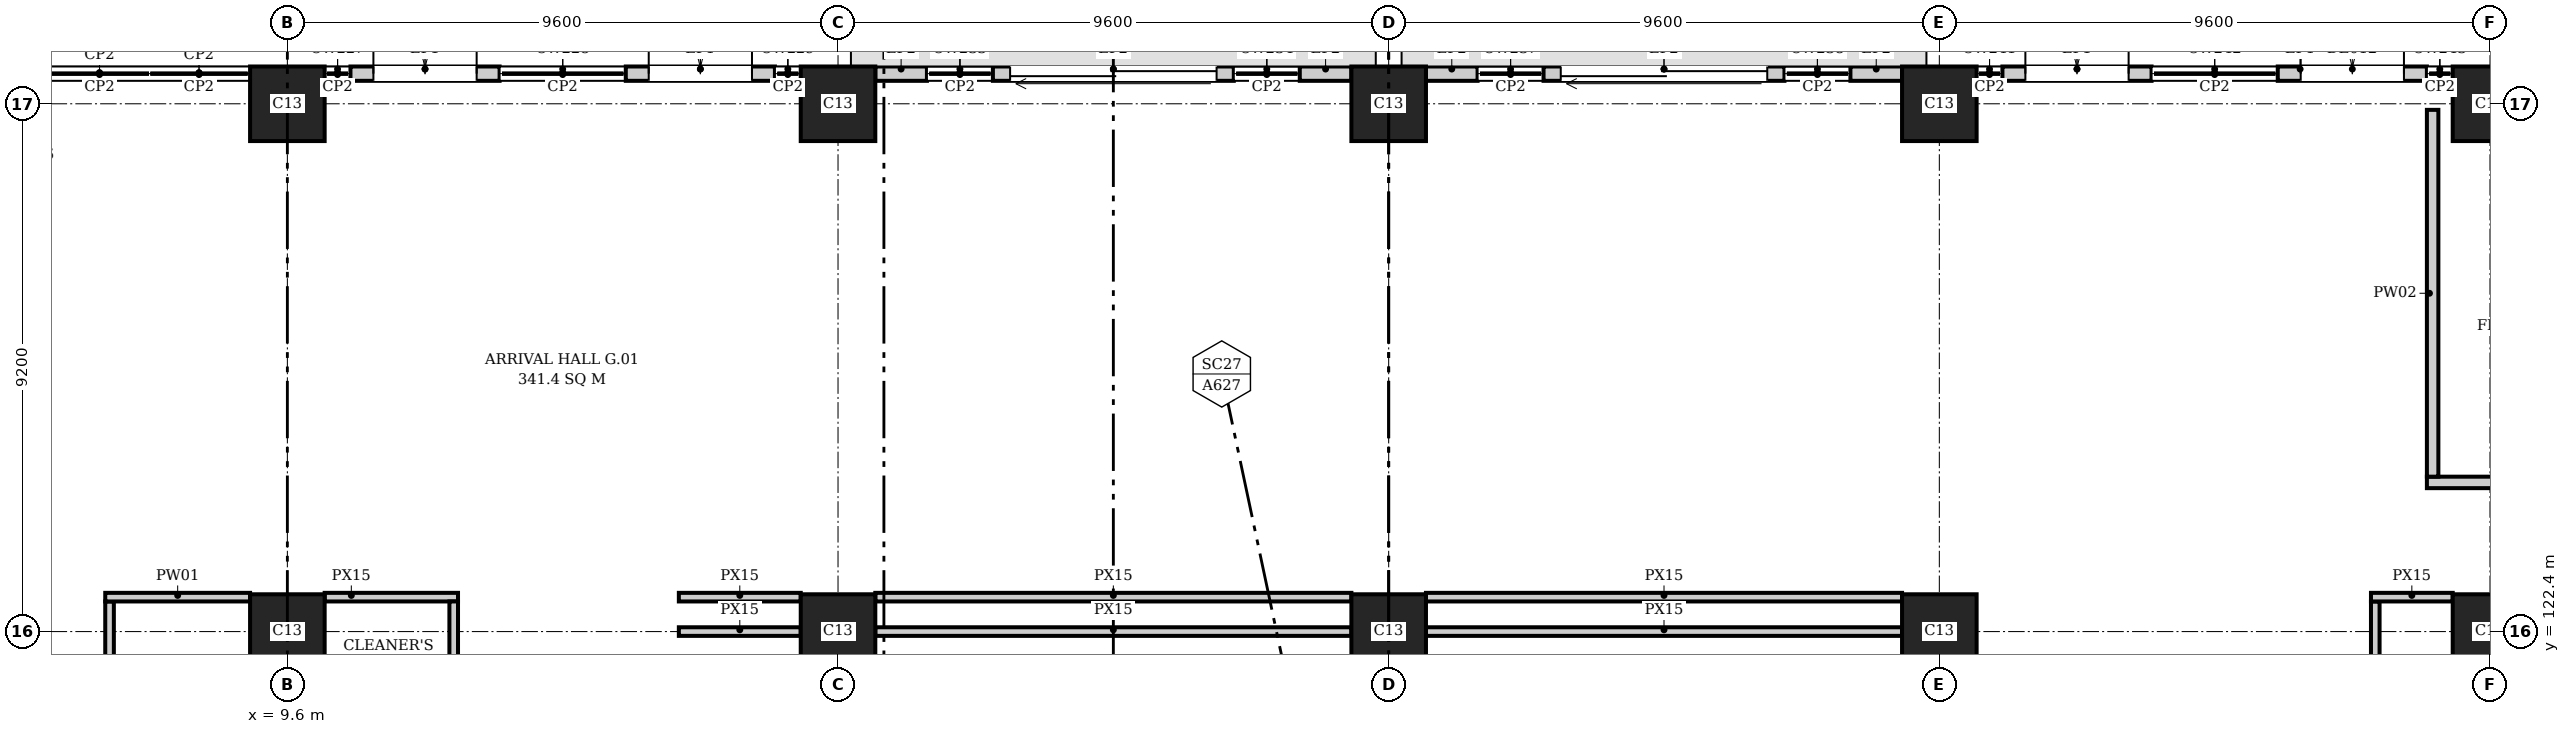
"""IFC4 building model, lengths in metres.
Left out: names, types, materials, properties, quantities, classifications, styles, units other than length and angle.
Written with IfcOpenShell. Run it as: python <this file> out.ifc"""

import sys

from ifc_helpers import new_model, si_unit, direction, frame, frame_2d, origin, origin_2d, place, context, subcontext, project, spatial, rectangle, extrude, element, fill, save


model = new_model("IFC4")
c1 = context("Model", 3, precision=1e-05, world=origin(), true_north=direction((0.0, 1.0)))
c2 = subcontext(c1, "Body", "Model", "MODEL_VIEW")
j1 = project(units=[si_unit("LENGTHUNIT", "METRE"), si_unit("PLANEANGLEUNIT", "RADIAN")], contexts=[c1])
p1 = place(None, origin())
s1 = spatial("IfcSite", under=j1, at=p1, CompositionType="ELEMENT")
p2 = place(p1, origin())
s2 = spatial("IfcBuilding", under=s1, at=p2, CompositionType="ELEMENT")
p3 = place(p2, origin())
s3 = spatial("IfcBuildingStorey", under=s2, at=p3, CompositionType="ELEMENT", Elevation=0.0)
for number, where, z_axis, x_axis in (
    (1, (9.6, 122.4, 0.0), (0.0, 0.0, 1.0), (1.0, 0.0, 0.0)),
    (2, (19.2, 122.4, 0.0), (0.0, 0.0, 1.0), (1.0, 0.0, 0.0)),
    (3, (28.8, 122.4, 0.0), (0.0, 0.0, 1.0), (1.0, 0.0, 0.0)),
    (4, (38.4, 122.4, 0.0), (0.0, 0.0, 1.0), (1.0, 0.0, 0.0)),
    (5, (48.0, 122.4, 0.0), (0.0, 0.0, 1.0), (1.0, 0.0, 0.0)),
    (6, (9.6, 131.6, 0.0), (0.0, 0.0, 1.0), (1.0, 0.0, 0.0)),
    (7, (19.2, 131.6, 0.0), (0.0, 0.0, 1.0), (1.0, 0.0, 0.0)),
    (8, (28.8, 131.6, 0.0), (0.0, 0.0, 1.0), (1.0, 0.0, 0.0)),
    (9, (38.4, 131.6, 0.0), (0.0, 0.0, 1.0), (1.0, 0.0, 0.0)),
    (10, (48.0, 131.6, 0.0), (0.0, 0.0, 1.0), (1.0, 0.0, 0.0)),
):
    element("IfcColumn", number, at=place(p3, frame(where, z_axis=z_axis, x_axis=x_axis)), inside=s3, PredefinedType="COLUMN", context=c2, shape_type="SweptSolid", body=[
        extrude(rectangle(XDim=1.3, YDim=1.3, at=origin_2d()), origin(), (0.0, 0.0, 1.0), 6.5),
    ])
p4 = place(p3, frame((13.3, 132.125, 0.0), z_axis=(0.0, 0.0, 1.0), x_axis=(-1.0, 0.0, 0.0)))
e11 = element("IfcWall", 11, at=p4, inside=s3, PredefinedType="ELEMENTEDWALL", context=c2, shape_type="SweptSolid", body=[
    extrude(rectangle(XDim=2.6, YDim=0.25, at=frame_2d((1.3, 0.0))), origin(), (0.0, 0.0, 1.0), 5.75),
])
p5 = place(p4, frame((0.4, 0.0, 0.0)))
e12 = element("IfcOpeningElement", 12, at=p5, cuts=e11, PredefinedType="OPENING", context=c2, shape_type="SweptSolid", body=[
    extrude(rectangle(XDim=1.8, YDim=2.4, at=frame_2d((0.9, 1.2))), frame((0.0, 0.135, 0.0), z_axis=(0.0, -1.0, 0.0), x_axis=(1.0, 0.0, 0.0)), (0.0, 0.0, 1.0), 0.27),
])
p6 = place(p3, frame((18.1, 132.125, 0.0), z_axis=(0.0, 0.0, 1.0), x_axis=(-1.0, 0.0, 0.0)))
e13 = element("IfcWall", 13, at=p6, inside=s3, PredefinedType="ELEMENTEDWALL", context=c2, shape_type="SweptSolid", body=[
    extrude(rectangle(XDim=2.6, YDim=0.25, at=frame_2d((1.3, 0.0))), origin(), (0.0, 0.0, 1.0), 5.75),
])
p7 = place(p6, frame((0.4, 0.0, 0.0)))
e14 = element("IfcOpeningElement", 14, at=p7, cuts=e13, PredefinedType="OPENING", context=c2, shape_type="SweptSolid", body=[
    extrude(rectangle(XDim=1.8, YDim=2.4, at=frame_2d((0.9, 1.2))), frame((0.0, 0.135, 0.0), z_axis=(0.0, -1.0, 0.0), x_axis=(1.0, 0.0, 0.0)), (0.0, 0.0, 1.0), 0.27),
])
p8 = place(p3, frame((20.75, 132.125, 0.0), z_axis=(0.0, 0.0, 1.0), x_axis=(-1.0, 0.0, 0.0)))
e15 = element("IfcWall", 15, at=p8, inside=s3, PredefinedType="ELEMENTEDWALL", context=c2, shape_type="SweptSolid", body=[
    extrude(rectangle(XDim=0.9, YDim=0.25, at=frame_2d((0.45, 0.0))), origin(), (0.0, 0.0, 1.0), 5.75),
])
p9 = place(p3, frame((26.1, 132.125, 0.0), z_axis=(0.0, 0.0, 1.0), x_axis=(-1.0, 0.0, 0.0)))
e16 = element("IfcWall", 16, at=p9, inside=s3, PredefinedType="ELEMENTEDWALL", context=c2, shape_type="SweptSolid", body=[
    extrude(rectangle(XDim=4.2, YDim=0.25, at=frame_2d((2.1, 0.0))), origin(), (0.0, 0.0, 1.0), 5.75),
])
p10 = place(p9, frame((0.3, 0.0, 0.0)))
e17 = element("IfcOpeningElement", 17, at=p10, cuts=e16, PredefinedType="OPENING", context=c2, shape_type="SweptSolid", body=[
    extrude(rectangle(XDim=3.6, YDim=4.5, at=frame_2d((1.8, 2.25))), frame((0.0, 0.135, 0.0), z_axis=(0.0, -1.0, 0.0), x_axis=(1.0, 0.0, 0.0)), (0.0, 0.0, 1.0), 0.27),
])
p11 = place(p3, frame((28.15, 132.125, 0.0), z_axis=(0.0, 0.0, 1.0), x_axis=(-1.0, 0.0, 0.0)))
e18 = element("IfcWall", 18, at=p11, inside=s3, PredefinedType="ELEMENTEDWALL", context=c2, shape_type="SweptSolid", body=[
    extrude(rectangle(XDim=0.9, YDim=0.25, at=frame_2d((0.45, 0.0))), origin(), (0.0, 0.0, 1.0), 5.75),
])
p12 = place(p3, frame((30.35, 132.125, 0.0), z_axis=(0.0, 0.0, 1.0), x_axis=(-1.0, 0.0, 0.0)))
e19 = element("IfcWall", 19, at=p12, inside=s3, PredefinedType="ELEMENTEDWALL", context=c2, shape_type="SweptSolid", body=[
    extrude(rectangle(XDim=0.9, YDim=0.25, at=frame_2d((0.45, 0.0))), origin(), (0.0, 0.0, 1.0), 5.75),
])
p13 = place(p3, frame((35.7, 132.125, 0.0), z_axis=(0.0, 0.0, 1.0), x_axis=(-1.0, 0.0, 0.0)))
e20 = element("IfcWall", 20, at=p13, inside=s3, PredefinedType="ELEMENTEDWALL", context=c2, shape_type="SweptSolid", body=[
    extrude(rectangle(XDim=4.2, YDim=0.25, at=frame_2d((2.1, 0.0))), origin(), (0.0, 0.0, 1.0), 5.75),
])
p14 = place(p13, frame((0.3, 0.0, 0.0)))
e21 = element("IfcOpeningElement", 21, at=p14, cuts=e20, PredefinedType="OPENING", context=c2, shape_type="SweptSolid", body=[
    extrude(rectangle(XDim=3.6, YDim=4.5, at=frame_2d((1.8, 2.25))), frame((0.0, 0.135, 0.0), z_axis=(0.0, -1.0, 0.0), x_axis=(1.0, 0.0, 0.0)), (0.0, 0.0, 1.0), 0.27),
])
p15 = place(p3, frame((37.75, 132.125, 0.0), z_axis=(0.0, 0.0, 1.0), x_axis=(-1.0, 0.0, 0.0)))
e22 = element("IfcWall", 22, at=p15, inside=s3, PredefinedType="ELEMENTEDWALL", context=c2, shape_type="SweptSolid", body=[
    extrude(rectangle(XDim=0.9, YDim=0.25, at=frame_2d((0.45, 0.0))), origin(), (0.0, 0.0, 1.0), 5.75),
])
p16 = place(p3, frame((42.1, 132.125, 0.0), z_axis=(0.0, 0.0, 1.0), x_axis=(-1.0, 0.0, 0.0)))
e23 = element("IfcWall", 23, at=p16, inside=s3, PredefinedType="ELEMENTEDWALL", context=c2, shape_type="SweptSolid", body=[
    extrude(rectangle(XDim=2.6, YDim=0.25, at=frame_2d((1.3, 0.0))), origin(), (0.0, 0.0, 1.0), 5.75),
])
p17 = place(p16, frame((0.4, 0.0, 0.0)))
e24 = element("IfcOpeningElement", 24, at=p17, cuts=e23, PredefinedType="OPENING", context=c2, shape_type="SweptSolid", body=[
    extrude(rectangle(XDim=1.8, YDim=2.4, at=frame_2d((0.9, 1.2))), frame((0.0, 0.135, 0.0), z_axis=(0.0, -1.0, 0.0), x_axis=(1.0, 0.0, 0.0)), (0.0, 0.0, 1.0), 0.27),
])
p18 = place(p3, frame((46.9, 132.125, 0.0), z_axis=(0.0, 0.0, 1.0), x_axis=(-1.0, 0.0, 0.0)))
e25 = element("IfcWall", 25, at=p18, inside=s3, PredefinedType="ELEMENTEDWALL", context=c2, shape_type="SweptSolid", body=[
    extrude(rectangle(XDim=2.6, YDim=0.25, at=frame_2d((1.3, 0.0))), origin(), (0.0, 0.0, 1.0), 5.75),
])
p19 = place(p18, frame((0.4, 0.0, 0.0)))
e26 = element("IfcOpeningElement", 26, at=p19, cuts=e25, PredefinedType="OPENING", context=c2, shape_type="SweptSolid", body=[
    extrude(rectangle(XDim=1.8, YDim=2.4, at=frame_2d((0.9, 1.2))), frame((0.0, 0.135, 0.0), z_axis=(0.0, -1.0, 0.0), x_axis=(1.0, 0.0, 0.0)), (0.0, 0.0, 1.0), 0.27),
])
p20 = place(p3, frame((6.5, 114.375, 0.0), z_axis=(0.0, 0.0, 1.0), x_axis=(0.0, 1.0, 0.0)))
e27 = element("IfcWall", 27, at=p20, inside=s3, PredefinedType="PARTITIONING", context=c2, shape_type="SweptSolid", body=[
    extrude(rectangle(XDim=8.55, YDim=0.15, at=frame_2d((4.275, 0.0))), origin(), (0.0, 0.0, 1.0), 6.15),
])
p21 = place(p20, frame((6.515, 0.0, 0.0)))
e28 = element("IfcOpeningElement", 28, at=p21, cuts=e27, PredefinedType="OPENING", context=c2, shape_type="SweptSolid", body=[
    extrude(rectangle(XDim=1.0, YDim=2.1, at=frame_2d((0.5, 1.05))), frame((0.0, 0.085, 0.0), z_axis=(0.0, -1.0, 0.0), x_axis=(1.0, 0.0, 0.0)), (0.0, 0.0, 1.0), 0.17),
])
p22 = place(p3, frame((6.425, 123.0, 0.0), z_axis=(0.0, 0.0, 1.0), x_axis=(1.0, 0.0, 0.0)))
e29 = element("IfcWall", 29, at=p22, inside=s3, PredefinedType="PARTITIONING", context=c2, shape_type="SweptSolid", body=[
    extrude(rectangle(XDim=2.525, YDim=0.15, at=frame_2d((1.262, 0.0))), origin(), (0.0, 0.0, 1.0), 6.15),
])
p23 = place(p3, frame((10.25, 123.0, 0.0), z_axis=(0.0, 0.0, 1.0), x_axis=(1.0, 0.0, 0.0)))
e30 = element("IfcWall", 30, at=p23, inside=s3, PredefinedType="PARTITIONING", context=c2, shape_type="SweptSolid", body=[
    extrude(rectangle(XDim=2.325, YDim=0.15, at=frame_2d((1.163, 0.0))), origin(), (0.0, 0.0, 1.0), 5.75),
])
p24 = place(p3, frame((12.5, 120.075, 0.0), z_axis=(0.0, 0.0, 1.0), x_axis=(0.0, 1.0, 0.0)))
e31 = element("IfcWall", 31, at=p24, inside=s3, PredefinedType="PARTITIONING", context=c2, shape_type="SweptSolid", body=[
    extrude(rectangle(XDim=2.85, YDim=0.15, at=frame_2d((1.425, 0.0))), origin(), (0.0, 0.0, 1.0), 6.15),
])
for number, where, z_axis, x_axis in (
    (32, (16.425, 122.4, 0.0), (0.0, 0.0, 1.0), (1.0, 0.0, 0.0)),
    (33, (16.425, 123.0, 0.0), (0.0, 0.0, 1.0), (1.0, 0.0, 0.0)),
):
    element("IfcWall", number, at=place(p3, frame(where, z_axis=z_axis, x_axis=x_axis)), inside=s3, PredefinedType="PARTITIONING", context=c2, shape_type="SweptSolid", body=[
        extrude(rectangle(XDim=2.125, YDim=0.15, at=frame_2d((1.062, 0.0))), origin(), (0.0, 0.0, 1.0), 5.75),
    ])
for number, where, z_axis, x_axis in (
    (34, (19.85, 122.4, 0.0), (0.0, 0.0, 1.0), (1.0, 0.0, 0.0)),
    (35, (19.85, 123.0, 0.0), (0.0, 0.0, 1.0), (1.0, 0.0, 0.0)),
):
    element("IfcWall", number, at=place(p3, frame(where, z_axis=z_axis, x_axis=x_axis)), inside=s3, PredefinedType="PARTITIONING", context=c2, shape_type="SweptSolid", body=[
        extrude(rectangle(XDim=8.3, YDim=0.15, at=frame_2d((4.15, 0.0))), origin(), (0.0, 0.0, 1.0), 5.75),
    ])
for number, where, z_axis, x_axis in (
    (36, (29.45, 122.4, 0.0), (0.0, 0.0, 1.0), (1.0, 0.0, 0.0)),
    (37, (29.45, 123.0, 0.0), (0.0, 0.0, 1.0), (1.0, 0.0, 0.0)),
):
    element("IfcWall", number, at=place(p3, frame(where, z_axis=z_axis, x_axis=x_axis)), inside=s3, PredefinedType="PARTITIONING", context=c2, shape_type="SweptSolid", body=[
        extrude(rectangle(XDim=8.3, YDim=0.15, at=frame_2d((4.15, 0.0))), origin(), (0.0, 0.0, 1.0), 5.75),
    ])
p25 = place(p3, frame((46.0, 113.275, 0.0), z_axis=(0.0, 0.0, 1.0), x_axis=(0.0, 1.0, 0.0)))
e38 = element("IfcWall", 38, at=p25, inside=s3, PredefinedType="PARTITIONING", context=c2, shape_type="SweptSolid", body=[
    extrude(rectangle(XDim=9.65, YDim=0.15, at=frame_2d((4.825, 0.0))), origin(), (0.0, 0.0, 1.0), 6.15),
])
p26 = place(p25, frame((2.935, 0.0, 0.0)))
e39 = element("IfcOpeningElement", 39, at=p26, cuts=e38, PredefinedType="OPENING", context=c2, shape_type="SweptSolid", body=[
    extrude(rectangle(XDim=1.0, YDim=2.1, at=frame_2d((0.5, 1.05))), frame((0.0, 0.085, 0.0), z_axis=(0.0, -1.0, 0.0), x_axis=(1.0, 0.0, 0.0)), (0.0, 0.0, 1.0), 0.17),
])
p27 = place(p25, frame((7.615, 0.0, 0.0)))
e40 = element("IfcOpeningElement", 40, at=p27, cuts=e38, PredefinedType="OPENING", context=c2, shape_type="SweptSolid", body=[
    extrude(rectangle(XDim=1.0, YDim=2.1, at=frame_2d((0.5, 1.05))), frame((0.0, 0.085, 0.0), z_axis=(0.0, -1.0, 0.0), x_axis=(1.0, 0.0, 0.0)), (0.0, 0.0, 1.0), 0.17),
])
p28 = place(p3, frame((45.925, 123.0, 0.0), z_axis=(0.0, 0.0, 1.0), x_axis=(1.0, 0.0, 0.0)))
e41 = element("IfcWall", 41, at=p28, inside=s3, PredefinedType="PARTITIONING", context=c2, shape_type="SweptSolid", body=[
    extrude(rectangle(XDim=1.425, YDim=0.15, at=frame_2d((0.712, 0.0))), origin(), (0.0, 0.0, 1.0), 5.75),
])
p29 = place(p3, frame((46.9, 125.0, 0.0), z_axis=(0.0, 0.0, 1.0), x_axis=(1.0, 0.0, 0.0)))
e42 = element("IfcWall", 42, at=p29, inside=s3, PredefinedType="PARTITIONING", context=c2, shape_type="SweptSolid", body=[
    extrude(rectangle(XDim=6.2, YDim=0.2, at=frame_2d((3.1, 0.0))), origin(), (0.0, 0.0, 1.0), 6.15),
])
p30 = place(p3, frame((47.0, 125.1, 0.0), z_axis=(0.0, 0.0, 1.0), x_axis=(0.0, 1.0, 0.0)))
e43 = element("IfcWall", 43, at=p30, inside=s3, PredefinedType="PARTITIONING", context=c2, shape_type="SweptSolid", body=[
    extrude(rectangle(XDim=6.394, YDim=0.2, at=frame_2d((3.197, 0.0))), origin(), (0.0, 0.0, 1.0), 6.15),
])
p31 = place(p5, frame((1.8, 0.0, 0.0), z_axis=(0.0, 0.0, 1.0), x_axis=(-1.0, 0.0, 0.0)))
e44 = element("IfcDoor", 44, at=p31, inside=s3, OperationType="DOUBLE_DOOR_SINGLE_SWING", PredefinedType="DOOR", context=c2, shape_type="SweptSolid", body=[
    extrude(rectangle(XDim=1.8, YDim=2.4, at=frame_2d((0.9, 1.2))), frame((0.0, 0.025, 0.0), z_axis=(0.0, -1.0, 0.0), x_axis=(1.0, 0.0, 0.0)), (0.0, 0.0, 1.0), 0.05),
])
fill(e12, e44)
p32 = place(p7, frame((1.8, 0.0, 0.0), z_axis=(0.0, 0.0, 1.0), x_axis=(-1.0, 0.0, 0.0)))
e45 = element("IfcDoor", 45, at=p32, inside=s3, OperationType="DOUBLE_DOOR_SINGLE_SWING", PredefinedType="DOOR", context=c2, shape_type="SweptSolid", body=[
    extrude(rectangle(XDim=1.8, YDim=2.4, at=frame_2d((0.9, 1.2))), frame((0.0, 0.025, 0.0), z_axis=(0.0, -1.0, 0.0), x_axis=(1.0, 0.0, 0.0)), (0.0, 0.0, 1.0), 0.05),
])
fill(e14, e45)
p33 = place(p10, frame((3.6, 0.0, 0.0), z_axis=(0.0, 0.0, 1.0), x_axis=(-1.0, 0.0, 0.0)))
e46 = element("IfcDoor", 46, at=p33, inside=s3, OperationType="DOUBLE_DOOR_SLIDING", PredefinedType="DOOR", context=c2, shape_type="SweptSolid", body=[
    extrude(rectangle(XDim=3.6, YDim=4.5, at=frame_2d((1.8, 2.25))), frame((0.0, 0.025, 0.0), z_axis=(0.0, -1.0, 0.0), x_axis=(1.0, 0.0, 0.0)), (0.0, 0.0, 1.0), 0.05),
])
fill(e17, e46)
p34 = place(p14, frame((3.6, 0.0, 0.0), z_axis=(0.0, 0.0, 1.0), x_axis=(-1.0, 0.0, 0.0)))
e47 = element("IfcDoor", 47, at=p34, inside=s3, OperationType="DOUBLE_DOOR_SLIDING", PredefinedType="DOOR", context=c2, shape_type="SweptSolid", body=[
    extrude(rectangle(XDim=3.6, YDim=4.5, at=frame_2d((1.8, 2.25))), frame((0.0, 0.025, 0.0), z_axis=(0.0, -1.0, 0.0), x_axis=(1.0, 0.0, 0.0)), (0.0, 0.0, 1.0), 0.05),
])
fill(e21, e47)
p35 = place(p17, frame((1.8, 0.0, 0.0), z_axis=(0.0, 0.0, 1.0), x_axis=(-1.0, 0.0, 0.0)))
e48 = element("IfcDoor", 48, at=p35, inside=s3, OperationType="DOUBLE_DOOR_SINGLE_SWING", PredefinedType="DOOR", context=c2, shape_type="SweptSolid", body=[
    extrude(rectangle(XDim=1.8, YDim=2.4, at=frame_2d((0.9, 1.2))), frame((0.0, 0.025, 0.0), z_axis=(0.0, -1.0, 0.0), x_axis=(1.0, 0.0, 0.0)), (0.0, 0.0, 1.0), 0.05),
])
fill(e24, e48)
p36 = place(p19, frame((1.8, 0.0, 0.0), z_axis=(0.0, 0.0, 1.0), x_axis=(-1.0, 0.0, 0.0)))
e49 = element("IfcDoor", 49, at=p36, inside=s3, OperationType="DOUBLE_DOOR_SINGLE_SWING", PredefinedType="DOOR", context=c2, shape_type="SweptSolid", body=[
    extrude(rectangle(XDim=1.8, YDim=2.4, at=frame_2d((0.9, 1.2))), frame((0.0, 0.025, 0.0), z_axis=(0.0, -1.0, 0.0), x_axis=(1.0, 0.0, 0.0)), (0.0, 0.0, 1.0), 0.05),
])
fill(e26, e49)
save(model, sys.argv[1])
